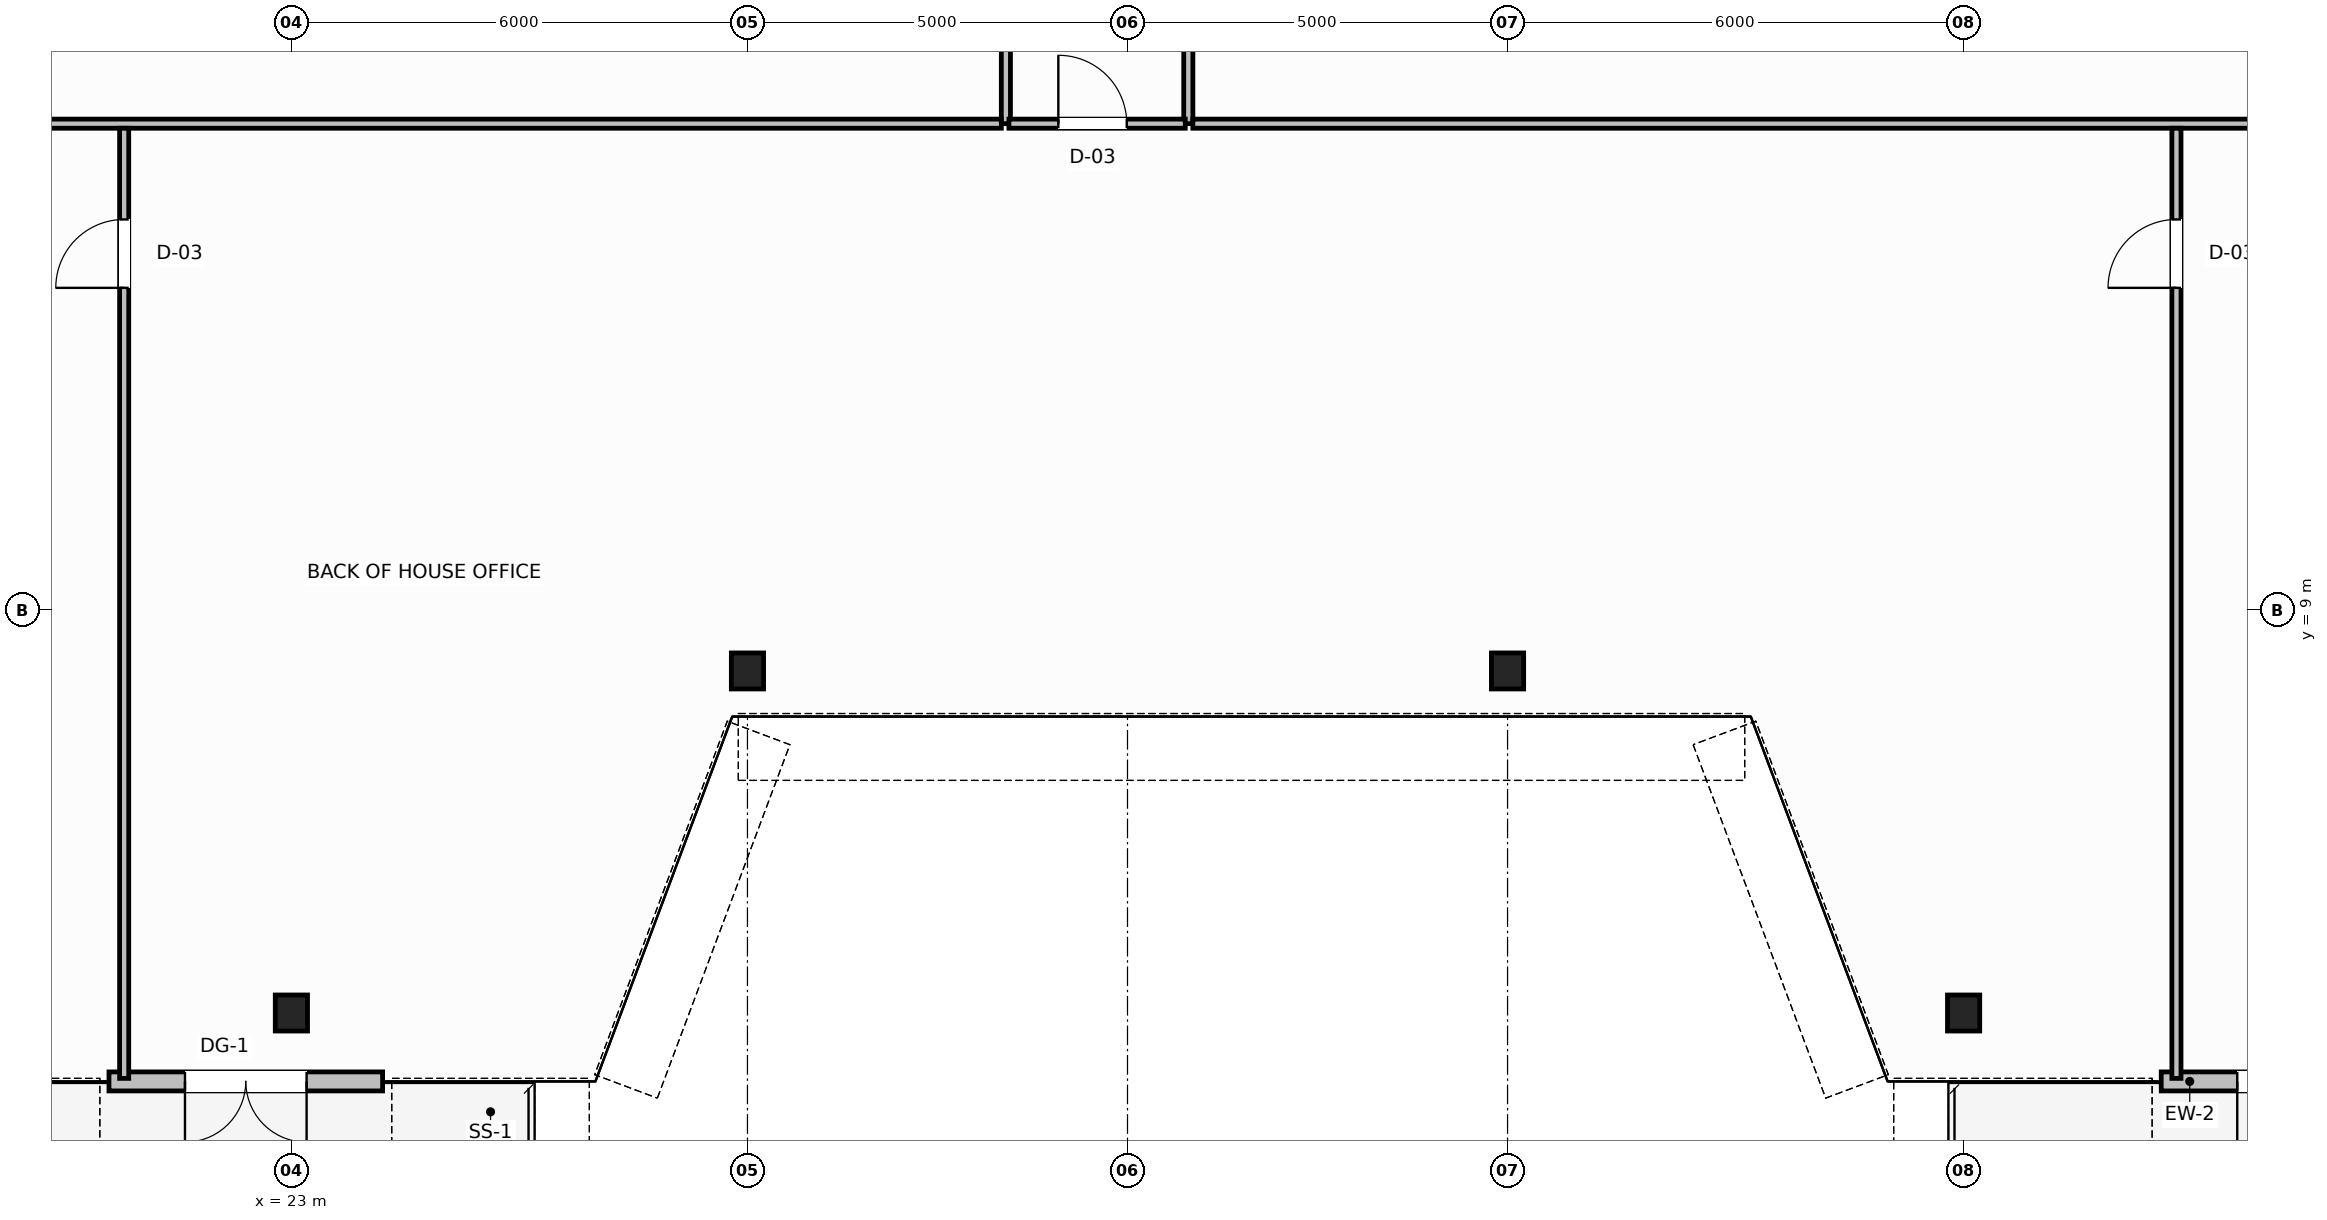
"""IFC4 building model, lengths in metres.
Left out: names, types, materials, properties, quantities, classifications, styles, units other than length and angle.
Written with IfcOpenShell. Run it as: python <this file> out.ifc"""

import sys

from ifc_helpers import new_model, si_unit, direction, frame, frame_2d, origin, origin_2d, place, context, subcontext, project, spatial, rectangle, i_section, extrude, source, transform, mapped, element, fill, save


model = new_model("IFC4")
c1 = context("Model", 3, precision=1e-05, world=origin(), true_north=direction((0.0, 1.0)))
c2 = subcontext(c1, "Body", "Model", "MODEL_VIEW")
j1 = project(units=[si_unit("LENGTHUNIT", "METRE"), si_unit("PLANEANGLEUNIT", "RADIAN")], contexts=[c1])
p1 = place(None, origin())
s1 = spatial("IfcSite", under=j1, at=p1, CompositionType="ELEMENT")
p2 = place(p1, origin())
s2 = spatial("IfcBuilding", under=s1, at=p2, CompositionType="ELEMENT")
p3 = place(p2, frame((0.0, 0.0, 153.8)))
s3 = spatial("IfcBuildingStorey", under=s2, at=p3, CompositionType="ELEMENT", Elevation=153.8)
m1 = source(origin(), c2, "Body", "SweptSolid", [
    extrude(i_section(OverallWidth=0.424, OverallDepth=0.474, WebThickness=0.047, FlangeThickness=0.065, FilletRadius=0.015, at=origin_2d()), origin(), (0.0, 0.0, 1.0), 4.06),
])
for number, where, z_axis, x_axis in (
    (1, (23.0, 3.7, -0.26), (0.0, 0.0, 1.0), (1.0, 0.0, 0.0)),
    (2, (29.0, 8.2, -0.26), (0.0, 0.0, 1.0), (1.0, 0.0, 0.0)),
    (3, (39.0, 8.2, -0.26), (0.0, 0.0, 1.0), (1.0, 0.0, 0.0)),
    (4, (45.0, 3.7, -0.26), (0.0, 0.0, 1.0), (1.0, 0.0, 0.0)),
):
    element("IfcColumn", number, at=place(p3, frame(where, z_axis=z_axis, x_axis=x_axis)), inside=s3, PredefinedType="COLUMN", context=c2, shape_type="MappedRepresentation", body=[
        mapped(m1, transform((0.0, 0.0, 0.0), scale=1.0)),
    ])
p4 = place(p3, frame((24.2, 2.8, 0.0), z_axis=(0.0, 0.0, 1.0), x_axis=(-1.0, 0.0, 0.0)))
e5 = element("IfcWall", 5, at=p4, inside=s3, PredefinedType="STANDARD", context=c2, shape_type="SweptSolid", body=[
    extrude(rectangle(XDim=3.6, YDim=0.25, at=frame_2d((1.8, 0.0))), origin(), (0.0, 0.0, 1.0), 3.58),
])
p5 = place(p4, frame((1.0, 0.0, 0.0)))
e6 = element("IfcOpeningElement", 6, at=p5, cuts=e5, PredefinedType="OPENING", context=c2, shape_type="SweptSolid", body=[
    extrude(rectangle(XDim=1.6, YDim=2.3, at=frame_2d((0.8, 1.15))), frame((0.0, 0.135, 0.0), z_axis=(0.0, -1.0, 0.0), x_axis=(1.0, 0.0, 0.0)), (0.0, 0.0, 1.0), 0.27),
])
p6 = place(p3, frame((51.2, 2.8, 0.0), z_axis=(0.0, 0.0, 1.0), x_axis=(-1.0, 0.0, 0.0)))
e7 = element("IfcWall", 7, at=p6, inside=s3, PredefinedType="STANDARD", context=c2, shape_type="SweptSolid", body=[
    extrude(rectangle(XDim=3.6, YDim=0.25, at=frame_2d((1.8, 0.0))), origin(), (0.0, 0.0, 1.0), 3.58),
])
p7 = place(p6, frame((1.0, 0.0, 0.0)))
e8 = element("IfcOpeningElement", 8, at=p7, cuts=e7, PredefinedType="OPENING", context=c2, shape_type="SweptSolid", body=[
    extrude(rectangle(XDim=1.6, YDim=2.3, at=frame_2d((0.8, 1.15))), frame((0.0, 0.135, 0.0), z_axis=(0.0, -1.0, 0.0), x_axis=(1.0, 0.0, 0.0)), (0.0, 0.0, 1.0), 0.27),
])
p8 = place(p3, frame((32.4, 15.4, 0.0), z_axis=(0.0, 0.0, 1.0), x_axis=(0.0, 1.0, 0.0)))
e9 = element("IfcWall", 9, at=p8, inside=s3, PredefinedType="PARTITIONING", context=c2, shape_type="SweptSolid", body=[
    extrude(rectangle(XDim=18.54, YDim=0.12, at=frame_2d((9.27, 0.0))), origin(), (0.0, 0.0, 1.0), 3.58),
])
p9 = place(p8, frame((4.45, 0.0, 0.0)))
e10 = element("IfcOpeningElement", 10, at=p9, cuts=e9, PredefinedType="OPENING", context=c2, shape_type="SweptSolid", body=[
    extrude(rectangle(XDim=0.9, YDim=2.15, at=frame_2d((0.45, 1.075))), frame((0.0, 0.07, 0.0), z_axis=(0.0, -1.0, 0.0), x_axis=(1.0, 0.0, 0.0)), (0.0, 0.0, 1.0), 0.14),
])
p10 = place(p8, frame((11.65, 0.0, 0.0)))
e11 = element("IfcOpeningElement", 11, at=p10, cuts=e9, PredefinedType="OPENING", context=c2, shape_type="SweptSolid", body=[
    extrude(rectangle(XDim=0.9, YDim=2.15, at=frame_2d((0.45, 1.075))), frame((0.0, 0.07, 0.0), z_axis=(0.0, -1.0, 0.0), x_axis=(1.0, 0.0, 0.0)), (0.0, 0.0, 1.0), 0.14),
])
p11 = place(p8, frame((16.02, 0.0, 0.0)))
e12 = element("IfcOpeningElement", 12, at=p11, cuts=e9, PredefinedType="OPENING", context=c2, shape_type="SweptSolid", body=[
    extrude(rectangle(XDim=0.9, YDim=2.15, at=frame_2d((0.45, 1.075))), frame((0.0, 0.07, 0.0), z_axis=(0.0, -1.0, 0.0), x_axis=(1.0, 0.0, 0.0)), (0.0, 0.0, 1.0), 0.14),
])
p12 = place(p3, frame((34.8, 15.4, 0.0), z_axis=(0.0, 0.0, 1.0), x_axis=(0.0, 1.0, 0.0)))
e13 = element("IfcWall", 13, at=p12, inside=s3, PredefinedType="PARTITIONING", context=c2, shape_type="SweptSolid", body=[
    extrude(rectangle(XDim=18.54, YDim=0.12, at=frame_2d((9.27, 0.0))), origin(), (0.0, 0.0, 1.0), 3.58),
])
p13 = place(p12, frame((4.15, 0.0, 0.0)))
e14 = element("IfcOpeningElement", 14, at=p13, cuts=e13, PredefinedType="OPENING", context=c2, shape_type="SweptSolid", body=[
    extrude(rectangle(XDim=0.9, YDim=2.15, at=frame_2d((0.45, 1.075))), frame((0.0, 0.07, 0.0), z_axis=(0.0, -1.0, 0.0), x_axis=(1.0, 0.0, 0.0)), (0.0, 0.0, 1.0), 0.14),
])
p14 = place(p12, frame((11.55, 0.0, 0.0)))
e15 = element("IfcOpeningElement", 15, at=p14, cuts=e13, PredefinedType="OPENING", context=c2, shape_type="SweptSolid", body=[
    extrude(rectangle(XDim=0.9, YDim=2.15, at=frame_2d((0.45, 1.075))), frame((0.0, 0.07, 0.0), z_axis=(0.0, -1.0, 0.0), x_axis=(1.0, 0.0, 0.0)), (0.0, 0.0, 1.0), 0.14),
])
p15 = place(p12, frame((16.22, 0.0, 0.0)))
e16 = element("IfcOpeningElement", 16, at=p15, cuts=e13, PredefinedType="OPENING", context=c2, shape_type="SweptSolid", body=[
    extrude(rectangle(XDim=0.9, YDim=2.15, at=frame_2d((0.45, 1.075))), frame((0.0, 0.07, 0.0), z_axis=(0.0, -1.0, 0.0), x_axis=(1.0, 0.0, 0.0)), (0.0, 0.0, 1.0), 0.14),
])
p16 = place(p3, frame((32.44, 15.4, 0.0), z_axis=(0.0, 0.0, 1.0), x_axis=(1.0, 0.0, 0.0)))
e17 = element("IfcWall", 17, at=p16, inside=s3, PredefinedType="PARTITIONING", context=c2, shape_type="SweptSolid", body=[
    extrude(rectangle(XDim=2.32, YDim=0.12, at=frame_2d((1.16, 0.0))), origin(), (0.0, 0.0, 1.0), 3.58),
])
p17 = place(p16, frame((0.65, 0.0, 0.0)))
e18 = element("IfcOpeningElement", 18, at=p17, cuts=e17, PredefinedType="OPENING", context=c2, shape_type="SweptSolid", body=[
    extrude(rectangle(XDim=0.9, YDim=2.15, at=frame_2d((0.45, 1.075))), frame((0.0, 0.07, 0.0), z_axis=(0.0, -1.0, 0.0), x_axis=(1.0, 0.0, 0.0)), (0.0, 0.0, 1.0), 0.14),
])
p18 = place(p3, frame((11.114, 15.4, 0.0), z_axis=(0.0, 0.0, 1.0), x_axis=(1.0, 0.0, 0.0)))
e19 = element("IfcWall", 19, at=p18, inside=s3, PredefinedType="PARTITIONING", context=c2, shape_type="SweptSolid", body=[
    extrude(rectangle(XDim=21.226, YDim=0.12, at=frame_2d((10.613, 0.0))), origin(), (0.0, 0.0, 1.0), 3.58),
])
p19 = place(p3, frame((34.86, 15.4, 0.0), z_axis=(0.0, 0.0, 1.0), x_axis=(1.0, 0.0, 0.0)))
e20 = element("IfcWall", 20, at=p19, inside=s3, PredefinedType="PARTITIONING", context=c2, shape_type="SweptSolid", body=[
    extrude(rectangle(XDim=22.026, YDim=0.12, at=frame_2d((11.013, 0.0))), origin(), (0.0, 0.0, 1.0), 3.58),
])
p20 = place(p3, frame((20.8, 2.84, 0.0), z_axis=(0.0, 0.0, 1.0), x_axis=(0.0, 1.0, 0.0)))
e21 = element("IfcWall", 21, at=p20, inside=s3, PredefinedType="PARTITIONING", context=c2, shape_type="SweptSolid", body=[
    extrude(rectangle(XDim=12.5, YDim=0.12, at=frame_2d((6.25, 0.0))), origin(), (0.0, 0.0, 1.0), 3.58),
])
p21 = place(p20, frame((10.4, 0.0, 0.0)))
e22 = element("IfcOpeningElement", 22, at=p21, cuts=e21, PredefinedType="OPENING", context=c2, shape_type="SweptSolid", body=[
    extrude(rectangle(XDim=0.9, YDim=2.15, at=frame_2d((0.45, 1.075))), frame((0.0, 0.07, 0.0), z_axis=(0.0, -1.0, 0.0), x_axis=(1.0, 0.0, 0.0)), (0.0, 0.0, 1.0), 0.14),
])
p22 = place(p3, frame((47.8, 2.84, 0.0), z_axis=(0.0, 0.0, 1.0), x_axis=(0.0, 1.0, 0.0)))
e23 = element("IfcWall", 23, at=p22, inside=s3, PredefinedType="PARTITIONING", context=c2, shape_type="SweptSolid", body=[
    extrude(rectangle(XDim=12.5, YDim=0.12, at=frame_2d((6.25, 0.0))), origin(), (0.0, 0.0, 1.0), 3.58),
])
p23 = place(p22, frame((10.4, 0.0, 0.0)))
e24 = element("IfcOpeningElement", 24, at=p23, cuts=e23, PredefinedType="OPENING", context=c2, shape_type="SweptSolid", body=[
    extrude(rectangle(XDim=0.9, YDim=2.15, at=frame_2d((0.45, 1.075))), frame((0.0, 0.07, 0.0), z_axis=(0.0, -1.0, 0.0), x_axis=(1.0, 0.0, 0.0)), (0.0, 0.0, 1.0), 0.14),
])
m2 = source(origin(), c2, "Body", "SweptSolid", [
    extrude(rectangle(XDim=1.6, YDim=2.3, at=frame_2d((0.8, 1.15))), frame((0.0, 0.025, 0.0), z_axis=(0.0, -1.0, 0.0), x_axis=(1.0, 0.0, 0.0)), (0.0, 0.0, 1.0), 0.05),
])
p24 = place(p5, origin())
e25 = element("IfcDoor", 25, at=p24, inside=s3, OperationType="DOUBLE_DOOR_SINGLE_SWING", PredefinedType="DOOR", context=c2, shape_type="MappedRepresentation", body=[
    mapped(m2, transform((0.0, 0.0, 0.0), scale=1.0)),
])
fill(e6, e25)
p25 = place(p7, origin())
e26 = element("IfcDoor", 26, at=p25, inside=s3, OperationType="DOUBLE_DOOR_SINGLE_SWING", PredefinedType="DOOR", context=c2, shape_type="MappedRepresentation", body=[
    mapped(m2, transform((0.0, 0.0, 0.0), scale=1.0)),
])
fill(e8, e26)
m3 = source(origin(), c2, "Body", "SweptSolid", [
    extrude(rectangle(XDim=0.9, YDim=2.15, at=frame_2d((0.45, 1.075))), frame((0.0, 0.025, 0.0), z_axis=(0.0, -1.0, 0.0), x_axis=(1.0, 0.0, 0.0)), (0.0, 0.0, 1.0), 0.05),
])
p26 = place(p21, origin())
e27 = element("IfcDoor", 27, at=p26, inside=s3, OperationType="SINGLE_SWING_RIGHT", PredefinedType="DOOR", context=c2, shape_type="MappedRepresentation", body=[
    mapped(m3, transform((0.0, 0.0, 0.0), scale=1.0)),
])
fill(e22, e27)
p27 = place(p17, origin())
e28 = element("IfcDoor", 28, at=p27, inside=s3, OperationType="SINGLE_SWING_LEFT", PredefinedType="DOOR", context=c2, shape_type="MappedRepresentation", body=[
    mapped(m3, transform((0.0, 0.0, 0.0), scale=1.0)),
])
fill(e18, e28)
p28 = place(p23, origin())
e29 = element("IfcDoor", 29, at=p28, inside=s3, OperationType="SINGLE_SWING_LEFT", PredefinedType="DOOR", context=c2, shape_type="MappedRepresentation", body=[
    mapped(m3, transform((0.0, 0.0, 0.0), scale=1.0)),
])
fill(e24, e29)
save(model, sys.argv[1])
